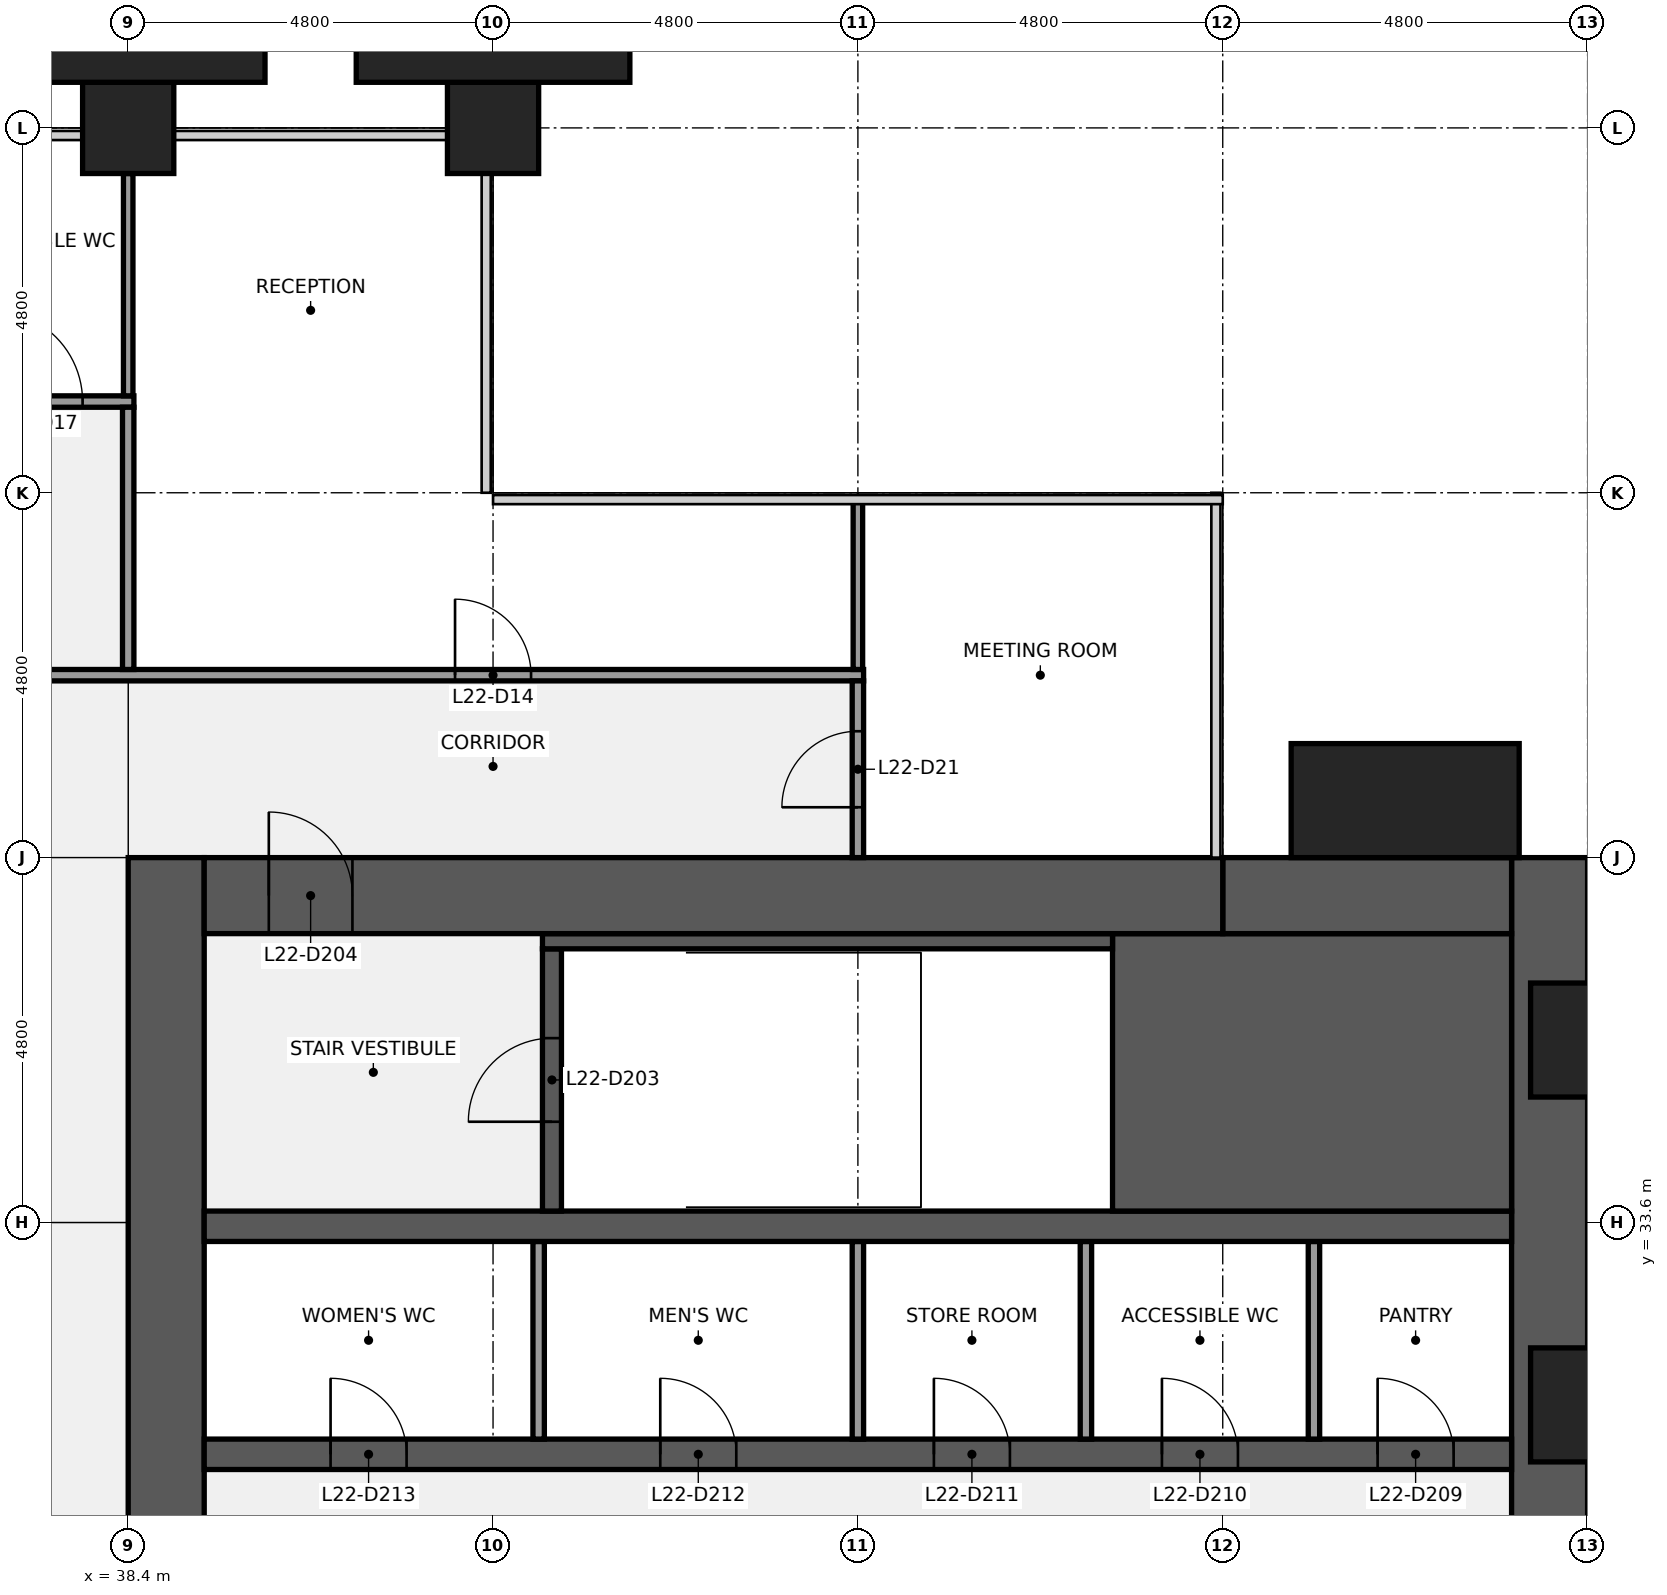
"""IFC4 building model, lengths in metres.
Left out: names, types, materials, properties, quantities, classifications, styles, units other than length and angle.
Written with IfcOpenShell. Run it as: python <this file> out.ifc"""

import sys

from ifc_helpers import new_model, si_unit, direction, frame, frame_2d, origin, origin_2d, place, context, subcontext, project, spatial, rectangle, extrude, element, fill, save


model = new_model("IFC4")
c1 = context("Model", 3, precision=1e-05, world=origin(), true_north=direction((0.0, 1.0)))
c2 = subcontext(c1, "Body", "Model", "MODEL_VIEW")
j1 = project(units=[si_unit("LENGTHUNIT", "METRE"), si_unit("PLANEANGLEUNIT", "RADIAN")], contexts=[c1])
p1 = place(None, origin())
s1 = spatial("IfcSite", under=j1, at=p1, CompositionType="ELEMENT")
p2 = place(p1, origin())
s2 = spatial("IfcBuilding", under=s1, at=p2, CompositionType="ELEMENT")
p3 = place(p2, frame((0.0, 0.0, 108.1)))
s3 = spatial("IfcBuildingStorey", under=s2, at=p3, CompositionType="ELEMENT", Elevation=108.1)
for number, where, z_axis, x_axis in (
    (1, (38.4, 48.0, 0.0), (0.0, 0.0, 1.0), (1.0, 0.0, 0.0)),
    (2, (43.2, 48.0, 0.0), (0.0, 0.0, 1.0), (1.0, 0.0, 0.0)),
):
    element("IfcColumn", number, at=place(p3, frame(where, z_axis=z_axis, x_axis=x_axis)), inside=s3, PredefinedType="COLUMN", context=c2, shape_type="SweptSolid", body=[
        extrude(rectangle(XDim=1.2, YDim=1.2, at=origin_2d()), origin(), (0.0, 0.0, 1.0), 4.0),
    ])
p4 = place(p3, frame((57.1, 38.4, 0.0), z_axis=(0.0, 0.0, 1.0), x_axis=(0.0, -1.0, 0.0)))
e3 = element("IfcWall", 3, at=p4, inside=s3, PredefinedType="SHEAR", context=c2, shape_type="SweptSolid", body=[
    extrude(rectangle(XDim=28.8, YDim=1.0, at=frame_2d((14.4, 0.0))), origin(), (0.0, 0.0, 1.0), 3.84),
])
p5 = place(p4, frame((18.45, 0.0, 0.9)))
e4 = element("IfcOpeningElement", 4, at=p5, cuts=e3, PredefinedType="OPENING", context=c2, shape_type="SweptSolid", body=[
    extrude(rectangle(XDim=1.5, YDim=1.5, at=frame_2d((0.75, 0.75))), frame((0.0, 0.51, 0.0), z_axis=(0.0, -1.0, 0.0), x_axis=(1.0, 0.0, 0.0)), (0.0, 0.0, 1.0), 1.02),
])
p6 = place(p4, frame((8.85, 0.0, 0.9)))
e5 = element("IfcOpeningElement", 5, at=p6, cuts=e3, PredefinedType="OPENING", context=c2, shape_type="SweptSolid", body=[
    extrude(rectangle(XDim=1.5, YDim=1.5, at=frame_2d((0.75, 0.75))), frame((0.0, 0.51, 0.0), z_axis=(0.0, -1.0, 0.0), x_axis=(1.0, 0.0, 0.0)), (0.0, 0.0, 1.0), 1.02),
])
p7 = place(p3, frame((38.9, 9.6, 0.0), z_axis=(0.0, 0.0, 1.0), x_axis=(0.0, 1.0, 0.0)))
e6 = element("IfcWall", 6, at=p7, inside=s3, PredefinedType="SHEAR", context=c2, shape_type="SweptSolid", body=[
    extrude(rectangle(XDim=28.8, YDim=1.0, at=frame_2d((14.4, 0.0))), origin(), (0.0, 0.0, 1.0), 3.84),
])
p8 = place(p7, frame((8.7, 0.0, 0.0)))
e7 = element("IfcOpeningElement", 7, at=p8, cuts=e6, PredefinedType="OPENING", context=c2, shape_type="SweptSolid", body=[
    extrude(rectangle(XDim=1.8, YDim=2.1, at=frame_2d((0.9, 1.05))), frame((0.0, 0.51, 0.0), z_axis=(0.0, -1.0, 0.0), x_axis=(1.0, 0.0, 0.0)), (0.0, 0.0, 1.0), 1.02),
])
p9 = place(p7, frame((18.3, 0.0, 0.0)))
e8 = element("IfcOpeningElement", 8, at=p9, cuts=e6, PredefinedType="OPENING", context=c2, shape_type="SweptSolid", body=[
    extrude(rectangle(XDim=1.8, YDim=2.1, at=frame_2d((0.9, 1.05))), frame((0.0, 0.51, 0.0), z_axis=(0.0, -1.0, 0.0), x_axis=(1.0, 0.0, 0.0)), (0.0, 0.0, 1.0), 1.02),
])
p10 = place(p3, frame((39.4, 30.55, 0.0), z_axis=(0.0, 0.0, 1.0), x_axis=(1.0, 0.0, 0.0)))
e9 = element("IfcWall", 9, at=p10, inside=s3, PredefinedType="SHEAR", context=c2, shape_type="SweptSolid", body=[
    extrude(rectangle(XDim=17.2, YDim=0.4, at=frame_2d((8.6, 0.0))), origin(), (0.0, 0.0, 1.0), 3.84),
])
p11 = place(p10, frame((15.438, 0.0, 0.0)))
e10 = element("IfcOpeningElement", 10, at=p11, cuts=e9, PredefinedType="OPENING", context=c2, shape_type="SweptSolid", body=[
    extrude(rectangle(XDim=1.0, YDim=2.1, at=frame_2d((0.5, 1.05))), frame((0.0, 0.21, 0.0), z_axis=(0.0, -1.0, 0.0), x_axis=(1.0, 0.0, 0.0)), (0.0, 0.0, 1.0), 0.42),
])
p12 = place(p10, frame((12.6, 0.0, 0.0)))
e11 = element("IfcOpeningElement", 11, at=p12, cuts=e9, PredefinedType="OPENING", context=c2, shape_type="SweptSolid", body=[
    extrude(rectangle(XDim=1.0, YDim=2.1, at=frame_2d((0.5, 1.05))), frame((0.0, 0.21, 0.0), z_axis=(0.0, -1.0, 0.0), x_axis=(1.0, 0.0, 0.0)), (0.0, 0.0, 1.0), 0.42),
])
p13 = place(p10, frame((9.6, 0.0, 0.0)))
e12 = element("IfcOpeningElement", 12, at=p13, cuts=e9, PredefinedType="OPENING", context=c2, shape_type="SweptSolid", body=[
    extrude(rectangle(XDim=1.0, YDim=2.1, at=frame_2d((0.5, 1.05))), frame((0.0, 0.21, 0.0), z_axis=(0.0, -1.0, 0.0), x_axis=(1.0, 0.0, 0.0)), (0.0, 0.0, 1.0), 0.42),
])
p14 = place(p10, frame((6.0, 0.0, 0.0)))
e13 = element("IfcOpeningElement", 13, at=p14, cuts=e9, PredefinedType="OPENING", context=c2, shape_type="SweptSolid", body=[
    extrude(rectangle(XDim=1.0, YDim=2.1, at=frame_2d((0.5, 1.05))), frame((0.0, 0.21, 0.0), z_axis=(0.0, -1.0, 0.0), x_axis=(1.0, 0.0, 0.0)), (0.0, 0.0, 1.0), 0.42),
])
p15 = place(p10, frame((1.663, 0.0, 0.0)))
e14 = element("IfcOpeningElement", 14, at=p15, cuts=e9, PredefinedType="OPENING", context=c2, shape_type="SweptSolid", body=[
    extrude(rectangle(XDim=1.0, YDim=2.1, at=frame_2d((0.5, 1.05))), frame((0.0, 0.21, 0.0), z_axis=(0.0, -1.0, 0.0), x_axis=(1.0, 0.0, 0.0)), (0.0, 0.0, 1.0), 0.42),
])
for number, where, z_axis, x_axis in (
    (15, (54.0, 30.75, 0.0), (0.0, 0.0, 1.0), (0.0, 1.0, 0.0)),
    (16, (51.0, 30.75, 0.0), (0.0, 0.0, 1.0), (0.0, 1.0, 0.0)),
    (17, (48.0, 30.75, 0.0), (0.0, 0.0, 1.0), (0.0, 1.0, 0.0)),
    (18, (43.8, 30.75, 0.0), (0.0, 0.0, 1.0), (0.0, 1.0, 0.0)),
):
    element("IfcWall", number, at=place(p3, frame(where, z_axis=z_axis, x_axis=x_axis)), inside=s3, PredefinedType="PARTITIONING", context=c2, shape_type="SweptSolid", body=[
        extrude(rectangle(XDim=2.6, YDim=0.15, at=frame_2d((1.3, 0.0))), origin(), (0.0, 0.0, 1.0), 3.84),
    ])
p16 = place(p3, frame((39.4, 33.55, 0.0), z_axis=(0.0, 0.0, 1.0), x_axis=(1.0, 0.0, 0.0)))
e19 = element("IfcWall", 19, at=p16, inside=s3, PredefinedType="SHEAR", context=c2, shape_type="SweptSolid", body=[
    extrude(rectangle(XDim=17.2, YDim=0.4, at=frame_2d((8.6, 0.0))), origin(), (0.0, 0.0, 1.0), 3.84),
])
p17 = place(p3, frame((51.35, 35.575, 0.0), z_axis=(0.0, 0.0, 1.0), x_axis=(1.0, 0.0, 0.0)))
e20 = element("IfcWall", 20, at=p17, inside=s3, PredefinedType="SHEAR", context=c2, shape_type="SweptSolid", body=[
    extrude(rectangle(XDim=5.25, YDim=3.65, at=frame_2d((2.625, 0.0))), origin(), (0.0, 0.0, 1.0), 3.84),
])
p18 = place(p3, frame((43.975, 33.75, 0.0), z_axis=(0.0, 0.0, 1.0), x_axis=(0.0, 1.0, 0.0)))
e21 = element("IfcWall", 21, at=p18, inside=s3, PredefinedType="SHEAR", context=c2, shape_type="SweptSolid", body=[
    extrude(rectangle(XDim=3.45, YDim=0.25, at=frame_2d((1.725, 0.0))), origin(), (0.0, 0.0, 1.0), 3.84),
])
p19 = place(p18, frame((1.175, 0.0, 0.0)))
e22 = element("IfcOpeningElement", 22, at=p19, cuts=e21, PredefinedType="OPENING", context=c2, shape_type="SweptSolid", body=[
    extrude(rectangle(XDim=1.1, YDim=2.1, at=frame_2d((0.55, 1.05))), frame((0.0, 0.135, 0.0), z_axis=(0.0, -1.0, 0.0), x_axis=(1.0, 0.0, 0.0)), (0.0, 0.0, 1.0), 0.27),
])
p20 = place(p3, frame((43.85, 37.3, 0.0), z_axis=(0.0, 0.0, 1.0), x_axis=(1.0, 0.0, 0.0)))
e23 = element("IfcWall", 23, at=p20, inside=s3, PredefinedType="SHEAR", context=c2, shape_type="SweptSolid", body=[
    extrude(rectangle(XDim=7.5, YDim=0.2, at=frame_2d((3.75, 0.0))), origin(), (0.0, 0.0, 1.0), 3.84),
])
p21 = place(p3, frame((52.8, 37.9, 0.0), z_axis=(0.0, 0.0, 1.0), x_axis=(1.0, 0.0, 0.0)))
e24 = element("IfcWall", 24, at=p21, inside=s3, PredefinedType="SHEAR", context=c2, shape_type="SweptSolid", body=[
    extrude(rectangle(XDim=3.8, YDim=1.0, at=frame_2d((1.9, 0.0))), origin(), (0.0, 0.0, 1.0), 3.84),
])
p22 = place(p3, frame((39.4, 37.9, 0.0), z_axis=(0.0, 0.0, 1.0), x_axis=(1.0, 0.0, 0.0)))
e25 = element("IfcWall", 25, at=p22, inside=s3, PredefinedType="SHEAR", context=c2, shape_type="SweptSolid", body=[
    extrude(rectangle(XDim=13.4, YDim=1.0, at=frame_2d((6.7, 0.0))), origin(), (0.0, 0.0, 1.0), 3.84),
])
p23 = place(p22, frame((0.85, 0.0, 0.0)))
e26 = element("IfcOpeningElement", 26, at=p23, cuts=e25, PredefinedType="OPENING", context=c2, shape_type="SweptSolid", body=[
    extrude(rectangle(XDim=1.1, YDim=2.1, at=frame_2d((0.55, 1.05))), frame((0.0, 0.51, 0.0), z_axis=(0.0, -1.0, 0.0), x_axis=(1.0, 0.0, 0.0)), (0.0, 0.0, 1.0), 1.02),
])
p24 = place(p3, frame((9.525, 40.8, 0.0), z_axis=(0.0, 0.0, 1.0), x_axis=(1.0, 0.0, 0.0)))
e27 = element("IfcWall", 27, at=p24, inside=s3, PredefinedType="PARTITIONING", context=c2, shape_type="SweptSolid", body=[
    extrude(rectangle(XDim=38.55, YDim=0.15, at=frame_2d((19.275, 0.0))), origin(), (0.0, 0.0, 1.0), 2.936),
])
p25 = place(p24, frame((4.375, 0.0, 0.0)))
e28 = element("IfcOpeningElement", 28, at=p25, cuts=e27, PredefinedType="OPENING", context=c2, shape_type="SweptSolid", body=[
    extrude(rectangle(XDim=1.0, YDim=2.1, at=frame_2d((0.5, 1.05))), frame((0.0, 0.085, 0.0), z_axis=(0.0, -1.0, 0.0), x_axis=(1.0, 0.0, 0.0)), (0.0, 0.0, 1.0), 0.17),
])
p26 = place(p24, frame((13.975, 0.0, 0.0)))
e29 = element("IfcOpeningElement", 29, at=p26, cuts=e27, PredefinedType="OPENING", context=c2, shape_type="SweptSolid", body=[
    extrude(rectangle(XDim=1.0, YDim=2.1, at=frame_2d((0.5, 1.05))), frame((0.0, 0.085, 0.0), z_axis=(0.0, -1.0, 0.0), x_axis=(1.0, 0.0, 0.0)), (0.0, 0.0, 1.0), 0.17),
])
p27 = place(p24, frame((19.975, 0.0, 0.0)))
e30 = element("IfcOpeningElement", 30, at=p27, cuts=e27, PredefinedType="OPENING", context=c2, shape_type="SweptSolid", body=[
    extrude(rectangle(XDim=1.0, YDim=2.1, at=frame_2d((0.5, 1.05))), frame((0.0, 0.085, 0.0), z_axis=(0.0, -1.0, 0.0), x_axis=(1.0, 0.0, 0.0)), (0.0, 0.0, 1.0), 0.17),
])
p28 = place(p24, frame((24.775, 0.0, 0.0)))
e31 = element("IfcOpeningElement", 31, at=p28, cuts=e27, PredefinedType="OPENING", context=c2, shape_type="SweptSolid", body=[
    extrude(rectangle(XDim=1.0, YDim=2.1, at=frame_2d((0.5, 1.05))), frame((0.0, 0.085, 0.0), z_axis=(0.0, -1.0, 0.0), x_axis=(1.0, 0.0, 0.0)), (0.0, 0.0, 1.0), 0.17),
])
p29 = place(p24, frame((33.175, 0.0, 0.0)))
e32 = element("IfcOpeningElement", 32, at=p29, cuts=e27, PredefinedType="OPENING", context=c2, shape_type="SweptSolid", body=[
    extrude(rectangle(XDim=1.0, YDim=2.1, at=frame_2d((0.5, 1.05))), frame((0.0, 0.085, 0.0), z_axis=(0.0, -1.0, 0.0), x_axis=(1.0, 0.0, 0.0)), (0.0, 0.0, 1.0), 0.17),
])
p30 = place(p3, frame((31.125, 44.4, 0.0), z_axis=(0.0, 0.0, 1.0), x_axis=(1.0, 0.0, 0.0)))
e33 = element("IfcWall", 33, at=p30, inside=s3, PredefinedType="PARTITIONING", context=c2, shape_type="SweptSolid", body=[
    extrude(rectangle(XDim=7.35, YDim=0.15, at=frame_2d((3.675, 0.0))), origin(), (0.0, 0.0, 1.0), 2.936),
])
p31 = place(p30, frame((0.825, 0.0, 0.0)))
e34 = element("IfcOpeningElement", 34, at=p31, cuts=e33, PredefinedType="OPENING", context=c2, shape_type="SweptSolid", body=[
    extrude(rectangle(XDim=0.9, YDim=2.1, at=frame_2d((0.45, 1.05))), frame((0.0, 0.085, 0.0), z_axis=(0.0, -1.0, 0.0), x_axis=(1.0, 0.0, 0.0)), (0.0, 0.0, 1.0), 0.17),
])
p32 = place(p30, frame((3.225, 0.0, 0.0)))
e35 = element("IfcOpeningElement", 35, at=p32, cuts=e33, PredefinedType="OPENING", context=c2, shape_type="SweptSolid", body=[
    extrude(rectangle(XDim=0.9, YDim=2.1, at=frame_2d((0.45, 1.05))), frame((0.0, 0.085, 0.0), z_axis=(0.0, -1.0, 0.0), x_axis=(1.0, 0.0, 0.0)), (0.0, 0.0, 1.0), 0.17),
])
p33 = place(p30, frame((5.475, 0.0, 0.0)))
e36 = element("IfcOpeningElement", 36, at=p33, cuts=e33, PredefinedType="OPENING", context=c2, shape_type="SweptSolid", body=[
    extrude(rectangle(XDim=1.2, YDim=2.1, at=frame_2d((0.6, 1.05))), frame((0.0, 0.085, 0.0), z_axis=(0.0, -1.0, 0.0), x_axis=(1.0, 0.0, 0.0)), (0.0, 0.0, 1.0), 0.17),
])
p34 = place(p3, frame((38.4, 44.475, 0.0), z_axis=(0.0, 0.0, 1.0), x_axis=(0.0, 1.0, 0.0)))
e37 = element("IfcWall", 37, at=p34, inside=s3, PredefinedType="PARTITIONING", context=c2, shape_type="SweptSolid", body=[
    extrude(rectangle(XDim=2.925, YDim=0.125, at=frame_2d((1.462, 0.0))), origin(), (0.0, 0.0, 1.0), 2.936),
])
p35 = place(p3, frame((38.4, 40.875, 0.0), z_axis=(0.0, 0.0, 1.0), x_axis=(0.0, 1.0, 0.0)))
e38 = element("IfcWall", 38, at=p35, inside=s3, PredefinedType="PARTITIONING", context=c2, shape_type="SweptSolid", body=[
    extrude(rectangle(XDim=3.45, YDim=0.15, at=frame_2d((1.725, 0.0))), origin(), (0.0, 0.0, 1.0), 2.936),
])
p36 = place(p3, frame((48.0, 40.875, 0.0), z_axis=(0.0, 0.0, 1.0), x_axis=(0.0, 1.0, 0.0)))
e39 = element("IfcWall", 39, at=p36, inside=s3, PredefinedType="PARTITIONING", context=c2, shape_type="SweptSolid", body=[
    extrude(rectangle(XDim=2.225, YDim=0.125, at=frame_2d((1.113, 0.0))), origin(), (0.0, 0.0, 1.0), 2.936),
])
p37 = place(p3, frame((48.0, 38.4, 0.0), z_axis=(0.0, 0.0, 1.0), x_axis=(0.0, 1.0, 0.0)))
e40 = element("IfcWall", 40, at=p37, inside=s3, PredefinedType="PARTITIONING", context=c2, shape_type="SweptSolid", body=[
    extrude(rectangle(XDim=2.325, YDim=0.15, at=frame_2d((1.163, 0.0))), origin(), (0.0, 0.0, 1.0), 2.936),
])
p38 = place(p37, frame((0.663, 0.0, 0.0)))
e41 = element("IfcOpeningElement", 41, at=p38, cuts=e40, PredefinedType="OPENING", context=c2, shape_type="SweptSolid", body=[
    extrude(rectangle(XDim=1.0, YDim=2.1, at=frame_2d((0.5, 1.05))), frame((0.0, 0.085, 0.0), z_axis=(0.0, -1.0, 0.0), x_axis=(1.0, 0.0, 0.0)), (0.0, 0.0, 1.0), 0.17),
])
p39 = place(p3, frame((55.2, 39.15, 0.0), z_axis=(0.0, 0.0, 1.0), x_axis=(1.0, 0.0, 0.0)))
e42 = element("IfcColumn", 42, at=p39, inside=s3, PredefinedType="PILASTER", context=c2, shape_type="SweptSolid", body=[
    extrude(rectangle(XDim=3.0, YDim=1.5, at=origin_2d()), origin(), (0.0, 0.0, 1.0), 4.0),
])
for number, where, z_axis, x_axis in (
    (43, (38.4, 49.05, 0.0), (0.0, 0.0, 1.0), (1.0, 0.0, 0.0)),
    (44, (43.2, 49.05, 0.0), (0.0, 0.0, 1.0), (1.0, 0.0, 0.0)),
):
    element("IfcColumn", number, at=place(p3, frame(where, z_axis=z_axis, x_axis=x_axis)), inside=s3, PredefinedType="PILASTER", context=c2, shape_type="SweptSolid", body=[
        extrude(rectangle(XDim=3.6, YDim=0.9, at=origin_2d()), origin(), (0.0, 0.0, 1.0), 4.0),
    ])
p40 = place(p19, origin())
e45 = element("IfcDoor", 45, at=p40, inside=s3, OperationType="SINGLE_SWING_LEFT", PredefinedType="DOOR", context=c2, shape_type="SweptSolid", body=[
    extrude(rectangle(XDim=1.1, YDim=2.1, at=frame_2d((0.55, 1.05))), frame((0.0, 0.025, 0.0), z_axis=(0.0, -1.0, 0.0), x_axis=(1.0, 0.0, 0.0)), (0.0, 0.0, 1.0), 0.05),
])
fill(e22, e45)
p41 = place(p23, origin())
e46 = element("IfcDoor", 46, at=p41, inside=s3, OperationType="SINGLE_SWING_LEFT", PredefinedType="DOOR", context=c2, shape_type="SweptSolid", body=[
    extrude(rectangle(XDim=1.1, YDim=2.1, at=frame_2d((0.55, 1.05))), frame((0.0, 0.025, 0.0), z_axis=(0.0, -1.0, 0.0), x_axis=(1.0, 0.0, 0.0)), (0.0, 0.0, 1.0), 0.05),
])
fill(e26, e46)
p42 = place(p11, origin())
e47 = element("IfcDoor", 47, at=p42, inside=s3, OperationType="SINGLE_SWING_LEFT", PredefinedType="DOOR", context=c2, shape_type="SweptSolid", body=[
    extrude(rectangle(XDim=1.0, YDim=2.1, at=frame_2d((0.5, 1.05))), frame((0.0, 0.025, 0.0), z_axis=(0.0, -1.0, 0.0), x_axis=(1.0, 0.0, 0.0)), (0.0, 0.0, 1.0), 0.05),
])
fill(e10, e47)
p43 = place(p12, origin())
e48 = element("IfcDoor", 48, at=p43, inside=s3, OperationType="SINGLE_SWING_LEFT", PredefinedType="DOOR", context=c2, shape_type="SweptSolid", body=[
    extrude(rectangle(XDim=1.0, YDim=2.1, at=frame_2d((0.5, 1.05))), frame((0.0, 0.025, 0.0), z_axis=(0.0, -1.0, 0.0), x_axis=(1.0, 0.0, 0.0)), (0.0, 0.0, 1.0), 0.05),
])
fill(e11, e48)
p44 = place(p13, origin())
e49 = element("IfcDoor", 49, at=p44, inside=s3, OperationType="SINGLE_SWING_LEFT", PredefinedType="DOOR", context=c2, shape_type="SweptSolid", body=[
    extrude(rectangle(XDim=1.0, YDim=2.1, at=frame_2d((0.5, 1.05))), frame((0.0, 0.025, 0.0), z_axis=(0.0, -1.0, 0.0), x_axis=(1.0, 0.0, 0.0)), (0.0, 0.0, 1.0), 0.05),
])
fill(e12, e49)
p45 = place(p14, origin())
e50 = element("IfcDoor", 50, at=p45, inside=s3, OperationType="SINGLE_SWING_LEFT", PredefinedType="DOOR", context=c2, shape_type="SweptSolid", body=[
    extrude(rectangle(XDim=1.0, YDim=2.1, at=frame_2d((0.5, 1.05))), frame((0.0, 0.025, 0.0), z_axis=(0.0, -1.0, 0.0), x_axis=(1.0, 0.0, 0.0)), (0.0, 0.0, 1.0), 0.05),
])
fill(e13, e50)
p46 = place(p15, origin())
e51 = element("IfcDoor", 51, at=p46, inside=s3, OperationType="SINGLE_SWING_LEFT", PredefinedType="DOOR", context=c2, shape_type="SweptSolid", body=[
    extrude(rectangle(XDim=1.0, YDim=2.1, at=frame_2d((0.5, 1.05))), frame((0.0, 0.025, 0.0), z_axis=(0.0, -1.0, 0.0), x_axis=(1.0, 0.0, 0.0)), (0.0, 0.0, 1.0), 0.05),
])
fill(e14, e51)
p47 = place(p29, origin())
e52 = element("IfcDoor", 52, at=p47, inside=s3, OperationType="SINGLE_SWING_LEFT", PredefinedType="DOOR", context=c2, shape_type="SweptSolid", body=[
    extrude(rectangle(XDim=1.0, YDim=2.1, at=frame_2d((0.5, 1.05))), frame((0.0, 0.025, 0.0), z_axis=(0.0, -1.0, 0.0), x_axis=(1.0, 0.0, 0.0)), (0.0, 0.0, 1.0), 0.05),
])
fill(e32, e52)
p48 = place(p33, origin())
e53 = element("IfcDoor", 53, at=p48, inside=s3, OperationType="SINGLE_SWING_LEFT", PredefinedType="DOOR", context=c2, shape_type="SweptSolid", body=[
    extrude(rectangle(XDim=1.2, YDim=2.1, at=frame_2d((0.6, 1.05))), frame((0.0, 0.025, 0.0), z_axis=(0.0, -1.0, 0.0), x_axis=(1.0, 0.0, 0.0)), (0.0, 0.0, 1.0), 0.05),
])
fill(e36, e53)
p49 = place(p38, origin())
e54 = element("IfcDoor", 54, at=p49, inside=s3, OperationType="SINGLE_SWING_LEFT", PredefinedType="DOOR", context=c2, shape_type="SweptSolid", body=[
    extrude(rectangle(XDim=1.0, YDim=2.1, at=frame_2d((0.5, 1.05))), frame((0.0, 0.025, 0.0), z_axis=(0.0, -1.0, 0.0), x_axis=(1.0, 0.0, 0.0)), (0.0, 0.0, 1.0), 0.05),
])
fill(e41, e54)
save(model, sys.argv[1])
